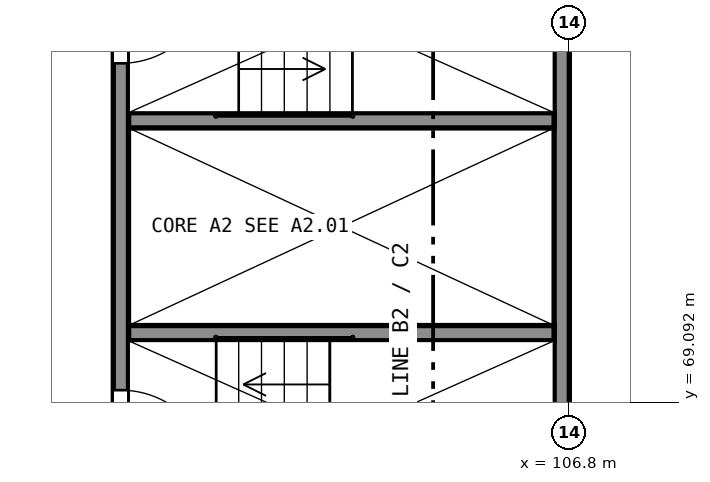
"""IFC4 building model, lengths in metres.
Left out: names, types, materials, properties, quantities, classifications, styles, units other than length and angle.
Written with IfcOpenShell. Run it as: python <this file> out.ifc"""

import sys

from ifc_helpers import new_model, si_unit, direction, frame, frame_2d, origin, place, context, subcontext, project, spatial, rectangle, extrude, element, fill, save


model = new_model("IFC4")
c1 = context("Model", 3, precision=1e-05, world=origin(), true_north=direction((0.0, 1.0)))
c2 = subcontext(c1, "Body", "Model", "MODEL_VIEW")
j1 = project(units=[si_unit("LENGTHUNIT", "METRE"), si_unit("PLANEANGLEUNIT", "RADIAN")], contexts=[c1])
p1 = place(None, origin())
s1 = spatial("IfcSite", under=j1, at=p1, CompositionType="ELEMENT")
p2 = place(p1, origin())
s2 = spatial("IfcBuilding", under=s1, at=p2, CompositionType="ELEMENT")
p3 = place(p2, frame((0.0, 0.0, 20.0)))
s3 = spatial("IfcBuildingStorey", under=s2, at=p3, CompositionType="ELEMENT", Elevation=20.0)
p4 = place(p3, frame((106.7, 67.4, 0.0), z_axis=(0.0, 0.0, 1.0), x_axis=(0.0, 1.0, 0.0)))
e1 = element("IfcWall", 1, at=p4, inside=s3, PredefinedType="SHEAR", context=c2, shape_type="SweptSolid", body=[
    extrude(rectangle(XDim=8.0, YDim=0.2, at=frame_2d((4.0, 0.0))), origin(), (0.0, 0.0, 1.0), 5.0),
])
p5 = place(p3, frame((100.9, 67.4, 0.0), z_axis=(0.0, 0.0, 1.0), x_axis=(0.0, 1.0, 0.0)))
e2 = element("IfcWall", 2, at=p5, inside=s3, PredefinedType="SHEAR", context=c2, shape_type="SweptSolid", body=[
    extrude(rectangle(XDim=8.0, YDim=0.2, at=frame_2d((4.0, 0.0))), origin(), (0.0, 0.0, 1.0), 5.0),
])
p6 = place(p5, frame((0.65, 0.0, 0.0)))
e3 = element("IfcOpeningElement", 3, at=p6, cuts=e2, PredefinedType="OPENING", context=c2, shape_type="SweptSolid", body=[
    extrude(rectangle(XDim=1.2, YDim=2.1, at=frame_2d((0.6, 1.05))), frame((0.0, 0.11, 0.0), z_axis=(0.0, -1.0, 0.0), x_axis=(1.0, 0.0, 0.0)), (0.0, 0.0, 1.0), 0.22),
])
p7 = place(p5, frame((6.15, 0.0, 0.0)))
e4 = element("IfcOpeningElement", 4, at=p7, cuts=e2, PredefinedType="OPENING", context=c2, shape_type="SweptSolid", body=[
    extrude(rectangle(XDim=1.2, YDim=2.1, at=frame_2d((0.6, 1.05))), frame((0.0, 0.11, 0.0), z_axis=(0.0, -1.0, 0.0), x_axis=(1.0, 0.0, 0.0)), (0.0, 0.0, 1.0), 0.22),
])
for number, where, z_axis, x_axis in (
    (5, (101.0, 70.0, 0.0), (0.0, 0.0, 1.0), (1.0, 0.0, 0.0)),
    (6, (101.0, 72.8, 0.0), (0.0, 0.0, 1.0), (1.0, 0.0, 0.0)),
):
    element("IfcWall", number, at=place(p3, frame(where, z_axis=z_axis, x_axis=x_axis)), inside=s3, PredefinedType="SHEAR", context=c2, shape_type="SweptSolid", body=[
        extrude(rectangle(XDim=5.6, YDim=0.2, at=frame_2d((2.8, 0.0))), origin(), (0.0, 0.0, 1.0), 5.0),
    ])
p8 = place(p6, origin())
e7 = element("IfcDoor", 7, at=p8, inside=s3, OperationType="SINGLE_SWING_LEFT", PredefinedType="DOOR", context=c2, shape_type="SweptSolid", body=[
    extrude(rectangle(XDim=1.2, YDim=2.1, at=frame_2d((0.6, 1.05))), frame((0.0, 0.025, 0.0), z_axis=(0.0, -1.0, 0.0), x_axis=(1.0, 0.0, 0.0)), (0.0, 0.0, 1.0), 0.05),
])
fill(e3, e7)
p9 = place(p7, origin())
e8 = element("IfcDoor", 8, at=p9, inside=s3, OperationType="SINGLE_SWING_RIGHT", PredefinedType="DOOR", context=c2, shape_type="SweptSolid", body=[
    extrude(rectangle(XDim=1.2, YDim=2.1, at=frame_2d((0.6, 1.05))), frame((0.0, 0.025, 0.0), z_axis=(0.0, -1.0, 0.0), x_axis=(1.0, 0.0, 0.0)), (0.0, 0.0, 1.0), 0.05),
])
fill(e4, e8)
save(model, sys.argv[1])
